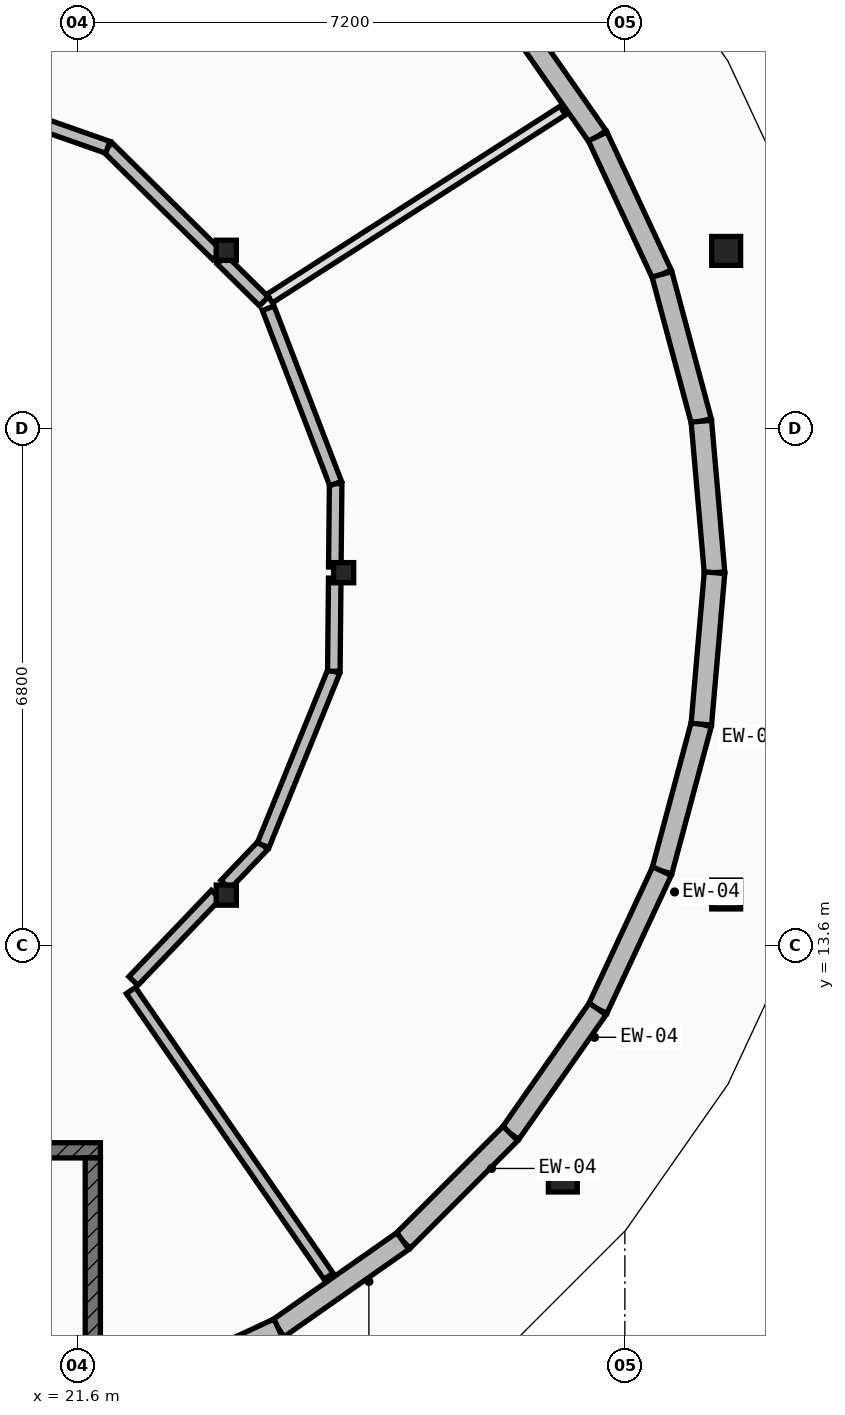
"""IFC4 building model, lengths in metres.
Left out: names, types, materials, properties, quantities, classifications, styles, units other than length and angle.
Written with IfcOpenShell. Run it as: python <this file> out.ifc"""

import sys

from ifc_helpers import new_model, si_unit, direction, frame, frame_2d, origin, origin_2d, place, context, subcontext, project, spatial, rectangle, circle, extrude, element, fill, save


model = new_model("IFC4")
c1 = context("Model", 3, precision=1e-05, world=origin(), true_north=direction((0.0, 1.0)))
c2 = subcontext(c1, "Body", "Model", "MODEL_VIEW")
j1 = project(units=[si_unit("LENGTHUNIT", "METRE"), si_unit("PLANEANGLEUNIT", "RADIAN")], contexts=[c1])
p1 = place(None, origin())
s1 = spatial("IfcSite", under=j1, at=p1, CompositionType="ELEMENT")
p2 = place(p1, origin())
s2 = spatial("IfcBuilding", under=s1, at=p2, CompositionType="ELEMENT")
p3 = place(p2, frame((0.0, 0.0, 17.15)))
s3 = spatial("IfcBuildingStorey", under=s2, at=p3, CompositionType="ELEMENT", Elevation=17.15)
for number, where, z_axis, x_axis in (
    (1, (30.133, 22.734, 0.0), (0.0, 0.0, 1.0), (1.0, 0.0, 0.0)),
    (2, (27.984, 10.542, 0.0), (0.0, 0.0, 1.0), (1.0, 0.0, 0.0)),
    (3, (30.133, 14.266, 0.0), (0.0, 0.0, 1.0), (1.0, 0.0, 0.0)),
):
    element("IfcColumn", number, at=place(p3, frame(where, z_axis=z_axis, x_axis=x_axis)), inside=s3, PredefinedType="PILASTER", context=c2, shape_type="SweptSolid", body=[
        extrude(circle(Radius=0.19, at=origin_2d()), origin(), (0.0, 0.0, 1.0), 4.2),
    ])
for number, where, z_axis, x_axis in (
    (4, (25.1, 18.5, 0.0), (0.0, 0.0, 1.0), (1.0, 0.0, 0.0)),
    (5, (23.556, 22.742, 0.0), (0.0, 0.0, 1.0), (1.0, 0.0, 0.0)),
    (6, (23.556, 14.258, 0.0), (0.0, 0.0, 1.0), (1.0, 0.0, 0.0)),
):
    element("IfcColumn", number, at=place(p3, frame(where, z_axis=z_axis, x_axis=x_axis)), inside=s3, PredefinedType="COLUMN", context=c2, shape_type="SweptSolid", body=[
        extrude(rectangle(XDim=0.265, YDim=0.265, at=origin_2d()), origin(), (0.0, 0.0, 1.0), 4.2),
    ])
p4 = place(p3, frame((29.806, 16.507, 0.0), z_axis=(0.0, 0.0, 1.0), x_axis=(-0.258748280927, -0.965944784715, 0.0)))
e7 = element("IfcWall", 7, at=p4, inside=s3, PredefinedType="ELEMENTEDWALL", context=c2, shape_type="SweptSolid", body=[
    extrude(rectangle(XDim=2.001, YDim=0.27, at=frame_2d((1.0, 0.0))), origin(), (0.0, 0.0, 1.0), 3.314),
])
p5 = place(p4, frame((0.426, 0.0, 0.85)))
e8 = element("IfcOpeningElement", 8, at=p5, cuts=e7, PredefinedType="OPENING", context=c2, shape_type="SweptSolid", body=[
    extrude(rectangle(XDim=1.15, YDim=1.4, at=frame_2d((0.575, 0.7))), frame((0.0, 0.145, 0.0), z_axis=(0.0, -1.0, 0.0), x_axis=(1.0, 0.0, 0.0)), (0.0, 0.0, 1.0), 0.29),
])
p6 = place(p3, frame((29.288, 14.574, 0.0), z_axis=(0.0, 0.0, 1.0), x_axis=(-0.422751915713, -0.906245451167, 0.0)))
e9 = element("IfcWall", 9, at=p6, inside=s3, PredefinedType="ELEMENTEDWALL", context=c2, shape_type="SweptSolid", body=[
    extrude(rectangle(XDim=2.002, YDim=0.27, at=frame_2d((1.001, 0.0))), origin(), (0.0, 0.0, 1.0), 3.314),
])
p7 = place(p6, frame((0.426, 0.0, 0.85)))
e10 = element("IfcOpeningElement", 10, at=p7, cuts=e9, PredefinedType="OPENING", context=c2, shape_type="SweptSolid", body=[
    extrude(rectangle(XDim=1.15, YDim=1.7, at=frame_2d((0.575, 0.85))), frame((0.0, 0.145, 0.0), z_axis=(0.0, -1.0, 0.0), x_axis=(1.0, 0.0, 0.0)), (0.0, 0.0, 1.0), 0.29),
])
p8 = place(p3, frame((28.442, 12.76, 0.0), z_axis=(0.0, 0.0, 1.0), x_axis=(-0.573699793029, -0.819065655169, 0.0)))
e11 = element("IfcWall", 11, at=p8, inside=s3, PredefinedType="ELEMENTEDWALL", context=c2, shape_type="SweptSolid", body=[
    extrude(rectangle(XDim=2.001, YDim=0.27, at=frame_2d((1.0, 0.0))), origin(), (0.0, 0.0, 1.0), 3.314),
])
p9 = place(p8, frame((0.426, 0.0, 0.85)))
e12 = element("IfcOpeningElement", 12, at=p9, cuts=e11, PredefinedType="OPENING", context=c2, shape_type="SweptSolid", body=[
    extrude(rectangle(XDim=1.15, YDim=2.0, at=frame_2d((0.575, 1.0))), frame((0.0, 0.145, 0.0), z_axis=(0.0, -1.0, 0.0), x_axis=(1.0, 0.0, 0.0)), (0.0, 0.0, 1.0), 0.29),
])
p10 = place(p3, frame((27.294, 11.121, 0.0), z_axis=(0.0, 0.0, 1.0), x_axis=(-0.707106781187, -0.707106781187, 0.0)))
e13 = element("IfcWall", 13, at=p10, inside=s3, PredefinedType="ELEMENTEDWALL", context=c2, shape_type="SweptSolid", body=[
    extrude(rectangle(XDim=2.001, YDim=0.27, at=frame_2d((1.0, 0.0))), origin(), (0.0, 0.0, 1.0), 3.314),
])
p11 = place(p10, frame((0.426, 0.0, 0.85)))
e14 = element("IfcOpeningElement", 14, at=p11, cuts=e13, PredefinedType="OPENING", context=c2, shape_type="SweptSolid", body=[
    extrude(rectangle(XDim=1.15, YDim=2.25, at=frame_2d((0.575, 1.125))), frame((0.0, 0.145, 0.0), z_axis=(0.0, -1.0, 0.0), x_axis=(1.0, 0.0, 0.0)), (0.0, 0.0, 1.0), 0.29),
])
p12 = place(p3, frame((25.879, 9.706, 0.0), z_axis=(0.0, 0.0, 1.0), x_axis=(-0.819065655169, -0.573699793029, 0.0)))
e15 = element("IfcWall", 15, at=p12, inside=s3, PredefinedType="ELEMENTEDWALL", context=c2, shape_type="SweptSolid", body=[
    extrude(rectangle(XDim=2.001, YDim=0.27, at=frame_2d((1.0, 0.0))), origin(), (0.0, 0.0, 1.0), 3.314),
])
p13 = place(p12, frame((0.411, 0.0, 0.85)))
e16 = element("IfcOpeningElement", 16, at=p13, cuts=e15, PredefinedType="OPENING", context=c2, shape_type="SweptSolid", body=[
    extrude(rectangle(XDim=1.18, YDim=1.55, at=frame_2d((0.59, 0.775))), frame((0.0, 0.145, 0.0), z_axis=(0.0, -1.0, 0.0), x_axis=(1.0, 0.0, 0.0)), (0.0, 0.0, 1.0), 0.29),
])
p14 = place(p3, frame((24.24, 8.558, 0.0), z_axis=(0.0, 0.0, 1.0), x_axis=(-0.906245451167, -0.422751915713, 0.0)))
e17 = element("IfcWall", 17, at=p14, inside=s3, PredefinedType="ELEMENTEDWALL", context=c2, shape_type="SweptSolid", body=[
    extrude(rectangle(XDim=2.002, YDim=0.27, at=frame_2d((1.001, 0.0))), origin(), (0.0, 0.0, 1.0), 3.314),
])
p15 = place(p14, frame((0.411, 0.0, 0.85)))
e18 = element("IfcOpeningElement", 18, at=p15, cuts=e17, PredefinedType="OPENING", context=c2, shape_type="SweptSolid", body=[
    extrude(rectangle(XDim=1.18, YDim=1.85, at=frame_2d((0.59, 0.925))), frame((0.0, 0.145, 0.0), z_axis=(0.0, -1.0, 0.0), x_axis=(1.0, 0.0, 0.0)), (0.0, 0.0, 1.0), 0.29),
])
p16 = place(p3, frame((27.294, 25.879, 0.0), z_axis=(0.0, 0.0, 1.0), x_axis=(0.573699793029, -0.819065655169, 0.0)))
e19 = element("IfcWall", 19, at=p16, inside=s3, PredefinedType="ELEMENTEDWALL", context=c2, shape_type="SweptSolid", body=[
    extrude(rectangle(XDim=2.001, YDim=0.27, at=frame_2d((1.0, 0.0))), origin(), (0.0, 0.0, 1.0), 3.314),
])
p17 = place(p16, frame((0.591, 0.0, 0.85)))
e20 = element("IfcOpeningElement", 20, at=p17, cuts=e19, PredefinedType="OPENING", context=c2, shape_type="SweptSolid", body=[
    extrude(rectangle(XDim=0.82, YDim=1.45, at=frame_2d((0.41, 0.725))), frame((0.0, 0.145, 0.0), z_axis=(0.0, -1.0, 0.0), x_axis=(1.0, 0.0, 0.0)), (0.0, 0.0, 1.0), 0.29),
])
p18 = place(p3, frame((28.442, 24.24, 0.0), z_axis=(0.0, 0.0, 1.0), x_axis=(0.422751915713, -0.906245451167, 0.0)))
e21 = element("IfcWall", 21, at=p18, inside=s3, PredefinedType="ELEMENTEDWALL", context=c2, shape_type="SweptSolid", body=[
    extrude(rectangle(XDim=2.002, YDim=0.27, at=frame_2d((1.001, 0.0))), origin(), (0.0, 0.0, 1.0), 3.314),
])
p19 = place(p18, frame((0.591, 0.0, 0.85)))
e22 = element("IfcOpeningElement", 22, at=p19, cuts=e21, PredefinedType="OPENING", context=c2, shape_type="SweptSolid", body=[
    extrude(rectangle(XDim=0.82, YDim=1.45, at=frame_2d((0.41, 0.725))), frame((0.0, 0.145, 0.0), z_axis=(0.0, -1.0, 0.0), x_axis=(1.0, 0.0, 0.0)), (0.0, 0.0, 1.0), 0.29),
])
p20 = place(p3, frame((29.288, 22.426, 0.0), z_axis=(0.0, 0.0, 1.0), x_axis=(0.258748280927, -0.965944784715, 0.0)))
e23 = element("IfcWall", 23, at=p20, inside=s3, PredefinedType="ELEMENTEDWALL", context=c2, shape_type="SweptSolid", body=[
    extrude(rectangle(XDim=2.001, YDim=0.27, at=frame_2d((1.0, 0.0))), origin(), (0.0, 0.0, 1.0), 3.314),
])
p21 = place(p20, frame((0.591, 0.0, 0.85)))
e24 = element("IfcOpeningElement", 24, at=p21, cuts=e23, PredefinedType="OPENING", context=c2, shape_type="SweptSolid", body=[
    extrude(rectangle(XDim=0.82, YDim=1.45, at=frame_2d((0.41, 0.725))), frame((0.0, 0.145, 0.0), z_axis=(0.0, -1.0, 0.0), x_axis=(1.0, 0.0, 0.0)), (0.0, 0.0, 1.0), 0.29),
])
p22 = place(p3, frame((29.806, 20.493, 0.0), z_axis=(0.0, 0.0, 1.0), x_axis=(0.087014045266, -0.996207084861, 0.0)))
e25 = element("IfcWall", 25, at=p22, inside=s3, PredefinedType="ELEMENTEDWALL", context=c2, shape_type="SweptSolid", body=[
    extrude(rectangle(XDim=2.0, YDim=0.27, at=frame_2d((1.0, 0.0))), origin(), (0.0, 0.0, 1.0), 3.314),
])
p23 = place(p22, frame((0.59, 0.0, 0.85)))
e26 = element("IfcOpeningElement", 26, at=p23, cuts=e25, PredefinedType="OPENING", context=c2, shape_type="SweptSolid", body=[
    extrude(rectangle(XDim=0.82, YDim=1.45, at=frame_2d((0.41, 0.725))), frame((0.0, 0.145, 0.0), z_axis=(0.0, -1.0, 0.0), x_axis=(1.0, 0.0, 0.0)), (0.0, 0.0, 1.0), 0.29),
])
p24 = place(p3, frame((29.98, 18.5, 0.0), z_axis=(0.0, 0.0, 1.0), x_axis=(-0.087014045266, -0.996207084861, 0.0)))
e27 = element("IfcWall", 27, at=p24, inside=s3, PredefinedType="ELEMENTEDWALL", context=c2, shape_type="SweptSolid", body=[
    extrude(rectangle(XDim=2.0, YDim=0.27, at=frame_2d((1.0, 0.0))), origin(), (0.0, 0.0, 1.0), 3.314),
])
p25 = place(p24, frame((0.59, 0.0, 0.85)))
e28 = element("IfcOpeningElement", 28, at=p25, cuts=e27, PredefinedType="OPENING", context=c2, shape_type="SweptSolid", body=[
    extrude(rectangle(XDim=0.82, YDim=1.45, at=frame_2d((0.41, 0.725))), frame((0.0, 0.145, 0.0), z_axis=(0.0, -1.0, 0.0), x_axis=(1.0, 0.0, 0.0)), (0.0, 0.0, 1.0), 0.29),
])
p26 = place(p3, frame((21.9, 10.9, 0.0), z_axis=(0.0, 0.0, 1.0), x_axis=(-1.0, 0.0, 0.0)))
e29 = element("IfcWall", 29, at=p26, inside=s3, PredefinedType="SHEAR", context=c2, shape_type="SweptSolid", body=[
    extrude(rectangle(XDim=6.8, YDim=0.2, at=frame_2d((3.4, 0.0))), origin(), (0.0, 0.0, 1.0), 3.96),
])
p27 = place(p26, frame((0.38, 0.0, 0.0)))
e30 = element("IfcOpeningElement", 30, at=p27, cuts=e29, PredefinedType="OPENING", context=c2, shape_type="SweptSolid", body=[
    extrude(rectangle(XDim=1.1, YDim=2.15, at=frame_2d((0.55, 1.075))), frame((0.0, 0.11, 0.0), z_axis=(0.0, -1.0, 0.0), x_axis=(1.0, 0.0, 0.0)), (0.0, 0.0, 1.0), 0.22),
])
p28 = place(p3, frame((21.8, 10.8, 0.0), z_axis=(0.0, 0.0, 1.0), x_axis=(0.0, -1.0, 0.0)))
e31 = element("IfcWall", 31, at=p28, inside=s3, PredefinedType="SHEAR", context=c2, shape_type="SweptSolid", body=[
    extrude(rectangle(XDim=2.9, YDim=0.2, at=frame_2d((1.45, 0.0))), origin(), (0.0, 0.0, 1.0), 3.96),
])
p29 = place(p3, frame((22.301, 13.003, 0.0), z_axis=(0.0, 0.0, 1.0), x_axis=(0.56891282969, -0.822397830867, 0.0)))
e32 = element("IfcWall", 32, at=p29, inside=s3, PredefinedType="PARTITIONING", context=c2, shape_type="SweptSolid", body=[
    extrude(rectangle(XDim=4.572, YDim=0.145, at=frame_2d((2.286, 0.0))), origin(), (0.0, 0.0, 1.0), 3.279),
])
p30 = place(p3, frame((24.126, 22.107, 0.0), z_axis=(0.0, 0.0, 1.0), x_axis=(0.841804640469, 0.53978231472, 0.0)))
e33 = element("IfcWall", 33, at=p30, inside=s3, PredefinedType="PLUMBINGWALL", context=c2, shape_type="SweptSolid", body=[
    extrude(rectangle(XDim=4.582, YDim=0.135, at=frame_2d((2.291, 0.0))), origin(), (0.0, 0.0, 1.0), 3.279),
])
p31 = place(p3, frame((22.334, 13.128, 0.0), z_axis=(0.0, 0.0, 1.0), x_axis=(0.69098960796, 0.722864691136, 0.0)))
e34 = element("IfcWall", 34, at=p31, inside=s3, PredefinedType="PARTITIONING", context=c2, shape_type="SweptSolid", body=[
    extrude(rectangle(XDim=1.57, YDim=0.165, at=frame_2d((0.785, 0.0))), origin(), (0.0, 0.0, 1.0), 3.279),
])
p32 = place(p31, frame((0.24, 0.0, 0.0)))
e35 = element("IfcOpeningElement", 35, at=p32, cuts=e34, PredefinedType="OPENING", context=c2, shape_type="SweptSolid", body=[
    extrude(rectangle(XDim=1.09, YDim=2.22, at=frame_2d((0.545, 1.11))), frame((0.0, 0.093, 0.0), z_axis=(0.0, -1.0, 0.0), x_axis=(1.0, 0.0, 0.0)), (0.0, 0.0, 1.0), 0.185),
])
p33 = place(p3, frame((23.545, 14.395, 0.0), z_axis=(0.0, 0.0, 1.0), x_axis=(0.690944661627, 0.722907652864, 0.0)))
e36 = element("IfcWall", 36, at=p33, inside=s3, PredefinedType="PARTITIONING", context=c2, shape_type="SweptSolid", body=[
    extrude(rectangle(XDim=0.718, YDim=0.165, at=frame_2d((0.359, 0.0))), origin(), (0.0, 0.0, 1.0), 3.279),
])
p34 = place(p3, frame((24.041, 14.914, 0.0), z_axis=(0.0, 0.0, 1.0), x_axis=(0.376411505865, 0.926452577444, 0.0)))
e37 = element("IfcWall", 37, at=p34, inside=s3, PredefinedType="PARTITIONING", context=c2, shape_type="SweptSolid", body=[
    extrude(rectangle(XDim=2.47, YDim=0.165, at=frame_2d((1.235, 0.0))), origin(), (0.0, 0.0, 1.0), 3.279),
])
p35 = place(p3, frame((24.971, 17.203, 0.0), z_axis=(0.0, 0.0, 1.0), x_axis=(0.009764381036, 0.999952327295, 0.0)))
e38 = element("IfcWall", 38, at=p35, inside=s3, PredefinedType="PARTITIONING", context=c2, shape_type="SweptSolid", body=[
    extrude(rectangle(XDim=1.225, YDim=0.165, at=frame_2d((0.613, 0.0))), origin(), (0.0, 0.0, 1.0), 3.279),
])
p36 = place(p3, frame((24.984, 18.574, 0.0), z_axis=(0.0, 0.0, 1.0), x_axis=(0.010217147704, 0.999947803584, 0.0)))
e39 = element("IfcWall", 39, at=p36, inside=s3, PredefinedType="PARTITIONING", context=c2, shape_type="SweptSolid", body=[
    extrude(rectangle(XDim=1.099, YDim=0.165, at=frame_2d((0.55, 0.0))), origin(), (0.0, 0.0, 1.0), 3.279),
])
p37 = place(p3, frame((24.995, 19.673, 0.0), z_axis=(0.0, 0.0, 1.0), x_axis=(-0.358959221796, 0.933353243465, 0.0)))
e40 = element("IfcWall", 40, at=p37, inside=s3, PredefinedType="PARTITIONING", context=c2, shape_type="SweptSolid", body=[
    extrude(rectangle(XDim=2.472, YDim=0.165, at=frame_2d((1.236, 0.0))), origin(), (0.0, 0.0, 1.0), 3.279),
])
p38 = place(p3, frame((24.051, 22.07, 0.0), z_axis=(0.0, 0.0, 1.0), x_axis=(-0.711623901059, 0.702560619051, 0.0)))
e41 = element("IfcWall", 41, at=p38, inside=s3, PredefinedType="PARTITIONING", context=c2, shape_type="SweptSolid", body=[
    extrude(rectangle(XDim=0.781, YDim=0.165, at=frame_2d((0.391, 0.0))), origin(), (0.0, 0.0, 1.0), 3.279),
])
p39 = place(p3, frame((23.434, 22.68, 0.0), z_axis=(0.0, 0.0, 1.0), x_axis=(-0.712049294093, 0.70212947722, 0.0)))
e42 = element("IfcWall", 42, at=p39, inside=s3, PredefinedType="PARTITIONING", context=c2, shape_type="SweptSolid", body=[
    extrude(rectangle(XDim=2.018, YDim=0.165, at=frame_2d((1.009, 0.0))), origin(), (0.0, 0.0, 1.0), 3.279),
])
p40 = place(p39, frame((0.559, 0.0, 0.0)))
e43 = element("IfcOpeningElement", 43, at=p40, cuts=e42, PredefinedType="OPENING", context=c2, shape_type="SweptSolid", body=[
    extrude(rectangle(XDim=0.9, YDim=2.1, at=frame_2d((0.45, 1.05))), frame((0.0, 0.093, 0.0), z_axis=(0.0, -1.0, 0.0), x_axis=(1.0, 0.0, 0.0)), (0.0, 0.0, 1.0), 0.185),
])
p41 = place(p3, frame((21.997, 24.097, 0.0), z_axis=(0.0, 0.0, 1.0), x_axis=(-0.943378428423, 0.331718466151, 0.0)))
e44 = element("IfcWall", 44, at=p41, inside=s3, PredefinedType="PARTITIONING", context=c2, shape_type="SweptSolid", body=[
    extrude(rectangle(XDim=2.4, YDim=0.165, at=frame_2d((1.2, 0.0))), origin(), (0.0, 0.0, 1.0), 3.279),
])
p42 = place(p5, origin())
e45 = element("IfcWindow", 45, at=p42, inside=s3, PartitioningType="SINGLE_PANEL", PredefinedType="WINDOW", context=c2, shape_type="SweptSolid", body=[
    extrude(rectangle(XDim=1.15, YDim=1.4, at=frame_2d((0.575, 0.7))), frame((0.0, 0.03, 0.0), z_axis=(0.0, -1.0, 0.0), x_axis=(1.0, 0.0, 0.0)), (0.0, 0.0, 1.0), 0.06),
])
fill(e8, e45)
p43 = place(p7, origin())
e46 = element("IfcWindow", 46, at=p43, inside=s3, PartitioningType="SINGLE_PANEL", PredefinedType="WINDOW", context=c2, shape_type="SweptSolid", body=[
    extrude(rectangle(XDim=1.15, YDim=1.7, at=frame_2d((0.575, 0.85))), frame((0.0, 0.03, 0.0), z_axis=(0.0, -1.0, 0.0), x_axis=(1.0, 0.0, 0.0)), (0.0, 0.0, 1.0), 0.06),
])
fill(e10, e46)
p44 = place(p9, origin())
e47 = element("IfcWindow", 47, at=p44, inside=s3, PartitioningType="SINGLE_PANEL", PredefinedType="WINDOW", context=c2, shape_type="SweptSolid", body=[
    extrude(rectangle(XDim=1.15, YDim=2.0, at=frame_2d((0.575, 1.0))), frame((0.0, 0.03, 0.0), z_axis=(0.0, -1.0, 0.0), x_axis=(1.0, 0.0, 0.0)), (0.0, 0.0, 1.0), 0.06),
])
fill(e12, e47)
p45 = place(p11, origin())
e48 = element("IfcWindow", 48, at=p45, inside=s3, PartitioningType="SINGLE_PANEL", PredefinedType="WINDOW", context=c2, shape_type="SweptSolid", body=[
    extrude(rectangle(XDim=1.15, YDim=2.25, at=frame_2d((0.575, 1.125))), frame((0.0, 0.03, 0.0), z_axis=(0.0, -1.0, 0.0), x_axis=(1.0, 0.0, 0.0)), (0.0, 0.0, 1.0), 0.06),
])
fill(e14, e48)
p46 = place(p13, origin())
e49 = element("IfcWindow", 49, at=p46, inside=s3, PartitioningType="SINGLE_PANEL", PredefinedType="WINDOW", context=c2, shape_type="SweptSolid", body=[
    extrude(rectangle(XDim=1.18, YDim=1.55, at=frame_2d((0.59, 0.775))), frame((0.0, 0.03, 0.0), z_axis=(0.0, -1.0, 0.0), x_axis=(1.0, 0.0, 0.0)), (0.0, 0.0, 1.0), 0.06),
])
fill(e16, e49)
p47 = place(p17, origin())
e50 = element("IfcWindow", 50, at=p47, inside=s3, PartitioningType="SINGLE_PANEL", PredefinedType="WINDOW", context=c2, shape_type="SweptSolid", body=[
    extrude(rectangle(XDim=0.82, YDim=1.45, at=frame_2d((0.41, 0.725))), frame((0.0, 0.03, 0.0), z_axis=(0.0, -1.0, 0.0), x_axis=(1.0, 0.0, 0.0)), (0.0, 0.0, 1.0), 0.06),
])
fill(e20, e50)
p48 = place(p19, origin())
e51 = element("IfcWindow", 51, at=p48, inside=s3, PartitioningType="SINGLE_PANEL", PredefinedType="WINDOW", context=c2, shape_type="SweptSolid", body=[
    extrude(rectangle(XDim=0.82, YDim=1.45, at=frame_2d((0.41, 0.725))), frame((0.0, 0.03, 0.0), z_axis=(0.0, -1.0, 0.0), x_axis=(1.0, 0.0, 0.0)), (0.0, 0.0, 1.0), 0.06),
])
fill(e22, e51)
p49 = place(p21, origin())
e52 = element("IfcWindow", 52, at=p49, inside=s3, PartitioningType="SINGLE_PANEL", PredefinedType="WINDOW", context=c2, shape_type="SweptSolid", body=[
    extrude(rectangle(XDim=0.82, YDim=1.45, at=frame_2d((0.41, 0.725))), frame((0.0, 0.03, 0.0), z_axis=(0.0, -1.0, 0.0), x_axis=(1.0, 0.0, 0.0)), (0.0, 0.0, 1.0), 0.06),
])
fill(e24, e52)
p50 = place(p23, origin())
e53 = element("IfcWindow", 53, at=p50, inside=s3, PartitioningType="SINGLE_PANEL", PredefinedType="WINDOW", context=c2, shape_type="SweptSolid", body=[
    extrude(rectangle(XDim=0.82, YDim=1.45, at=frame_2d((0.41, 0.725))), frame((0.0, 0.03, 0.0), z_axis=(0.0, -1.0, 0.0), x_axis=(1.0, 0.0, 0.0)), (0.0, 0.0, 1.0), 0.06),
])
fill(e26, e53)
p51 = place(p25, origin())
e54 = element("IfcWindow", 54, at=p51, inside=s3, PartitioningType="SINGLE_PANEL", PredefinedType="WINDOW", context=c2, shape_type="SweptSolid", body=[
    extrude(rectangle(XDim=0.82, YDim=1.45, at=frame_2d((0.41, 0.725))), frame((0.0, 0.03, 0.0), z_axis=(0.0, -1.0, 0.0), x_axis=(1.0, 0.0, 0.0)), (0.0, 0.0, 1.0), 0.06),
])
fill(e28, e54)
p52 = place(p27, origin())
e55 = element("IfcDoor", 55, at=p52, inside=s3, OperationType="SINGLE_SWING_RIGHT", PredefinedType="DOOR", context=c2, shape_type="SweptSolid", body=[
    extrude(rectangle(XDim=1.1, YDim=2.15, at=frame_2d((0.55, 1.075))), frame((0.0, 0.025, 0.0), z_axis=(0.0, -1.0, 0.0), x_axis=(1.0, 0.0, 0.0)), (0.0, 0.0, 1.0), 0.05),
])
fill(e30, e55)
p53 = place(p32, origin())
e56 = element("IfcDoor", 56, at=p53, inside=s3, OperationType="SINGLE_SWING_LEFT", PredefinedType="DOOR", context=c2, shape_type="SweptSolid", body=[
    extrude(rectangle(XDim=1.09, YDim=2.22, at=frame_2d((0.545, 1.11))), frame((0.0, 0.025, 0.0), z_axis=(0.0, -1.0, 0.0), x_axis=(1.0, 0.0, 0.0)), (0.0, 0.0, 1.0), 0.05),
])
fill(e35, e56)
p54 = place(p40, origin())
e57 = element("IfcDoor", 57, at=p54, inside=s3, OperationType="SINGLE_SWING_RIGHT", PredefinedType="DOOR", context=c2, shape_type="SweptSolid", body=[
    extrude(rectangle(XDim=0.9, YDim=2.1, at=frame_2d((0.45, 1.05))), frame((0.0, 0.025, 0.0), z_axis=(0.0, -1.0, 0.0), x_axis=(1.0, 0.0, 0.0)), (0.0, 0.0, 1.0), 0.05),
])
fill(e43, e57)
save(model, sys.argv[1])
